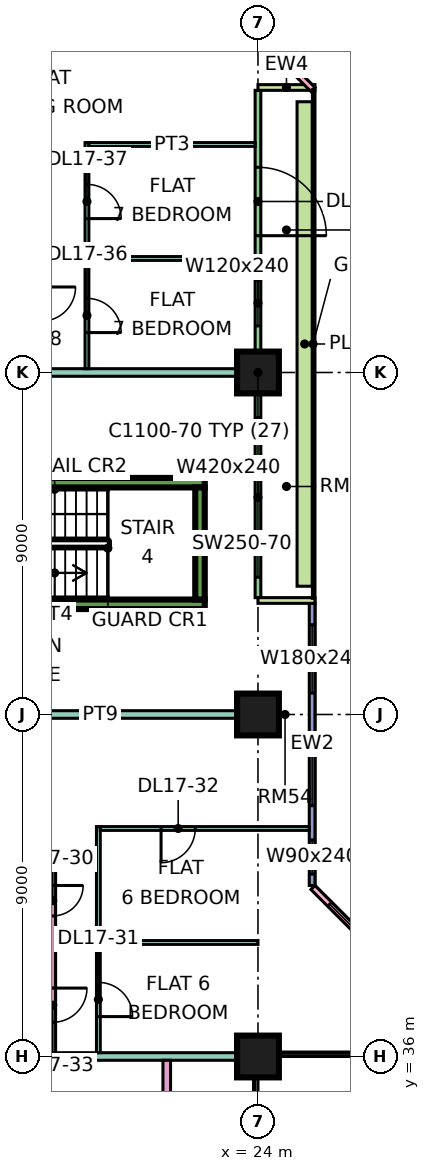
"""IFC4 building model, lengths in metres.
Left out: names, types, materials, properties, quantities, classifications, styles, units other than length and angle.
Written with IfcOpenShell. Run it as: python <this file> out.ifc"""

import sys

from ifc_helpers import new_model, si_unit, direction, frame, frame_2d, origin, origin_2d, place, context, subcontext, project, spatial, rectangle, extrude, element, fill, save


model = new_model("IFC4")
c1 = context("Model", 3, precision=1e-05, world=origin(), true_north=direction((0.0, 1.0)))
c2 = subcontext(c1, "Body", "Model", "MODEL_VIEW")
j1 = project(units=[si_unit("LENGTHUNIT", "METRE"), si_unit("PLANEANGLEUNIT", "RADIAN")], contexts=[c1])
p1 = place(None, origin())
s1 = spatial("IfcSite", under=j1, at=p1, CompositionType="ELEMENT")
p2 = place(p1, origin())
s2 = spatial("IfcBuilding", under=s1, at=p2, CompositionType="ELEMENT")
p3 = place(p2, frame((0.0, 0.0, 78.9)))
s3 = spatial("IfcBuildingStorey", under=s2, at=p3, CompositionType="ELEMENT", Elevation=78.9)
for number, where, z_axis, x_axis in (
    (1, (24.0, 36.0, 0.0), (0.0, 0.0, 1.0), (1.0, 0.0, 0.0)),
    (2, (24.0, 45.0, 0.0), (0.0, 0.0, 1.0), (1.0, 0.0, 0.0)),
    (3, (24.0, 54.0, 0.0), (0.0, 0.0, 1.0), (1.0, 0.0, 0.0)),
):
    element("IfcColumn", number, at=place(p3, frame(where, z_axis=z_axis, x_axis=x_axis)), inside=s3, PredefinedType="COLUMN", context=c2, shape_type="SweptSolid", body=[
        extrude(rectangle(XDim=1.1, YDim=1.1, at=origin_2d()), origin(), (0.0, 0.0, 1.0), 3.75),
    ])
for number, where, z_axis, x_axis in (
    (4, (15.6, 47.9, 0.0), (0.0, 0.0, 1.0), (1.0, 0.0, 0.0)),
    (5, (15.6, 51.1, 0.0), (0.0, 0.0, 1.0), (1.0, 0.0, 0.0)),
):
    element("IfcWall", number, at=place(p3, frame(where, z_axis=z_axis, x_axis=x_axis)), inside=s3, PredefinedType="SHEAR", context=c2, shape_type="SweptSolid", body=[
        extrude(rectangle(XDim=7.0, YDim=0.25, at=frame_2d((3.5, 0.0))), origin(), (0.0, 0.0, 1.0), 3.75),
    ])
p4 = place(p3, frame((22.475, 48.025, 0.0), z_axis=(0.0, 0.0, 1.0), x_axis=(0.0, 1.0, 0.0)))
e6 = element("IfcWall", 6, at=p4, inside=s3, PredefinedType="SHEAR", context=c2, shape_type="SweptSolid", body=[
    extrude(rectangle(XDim=2.95, YDim=0.25, at=frame_2d((1.475, 0.0))), origin(), (0.0, 0.0, 1.0), 3.75),
])
p5 = place(p3, frame((28.447, 37.447, 0.0), z_axis=(0.0, 0.0, 1.0), x_axis=(-0.707106781187, 0.707106781187, 0.0)))
e7 = element("IfcWall", 7, at=p5, inside=s3, PredefinedType="SOLIDWALL", context=c2, shape_type="SweptSolid", body=[
    extrude(rectangle(XDim=4.243, YDim=0.15, at=frame_2d((2.121, 0.0))), origin(), (0.0, 0.0, 1.0), 3.35),
])
p6 = place(p5, frame((0.621, 0.0, 0.45)))
e8 = element("IfcOpeningElement", 8, at=p6, cuts=e7, PredefinedType="OPENING", context=c2, shape_type="SweptSolid", body=[
    extrude(rectangle(XDim=3.0, YDim=2.4, at=frame_2d((1.5, 1.2))), frame((0.0, 0.085, 0.0), z_axis=(0.0, -1.0, 0.0), x_axis=(1.0, 0.0, 0.0)), (0.0, 0.0, 1.0), 0.17),
])
p7 = place(p3, frame((25.425, 40.5, 0.0), z_axis=(0.0, 0.0, 1.0), x_axis=(0.0, 1.0, 0.0)))
e9 = element("IfcWall", 9, at=p7, inside=s3, PredefinedType="SOLIDWALL", context=c2, shape_type="SweptSolid", body=[
    extrude(rectangle(XDim=7.425, YDim=0.15, at=frame_2d((3.712, 0.0))), origin(), (0.0, 0.0, 1.0), 3.35),
])
p8 = place(p7, frame((0.3, 0.0, 0.45)))
e10 = element("IfcOpeningElement", 10, at=p8, cuts=e9, PredefinedType="OPENING", context=c2, shape_type="SweptSolid", body=[
    extrude(rectangle(XDim=0.9, YDim=2.4, at=frame_2d((0.45, 1.2))), frame((0.0, 0.085, 0.0), z_axis=(0.0, -1.0, 0.0), x_axis=(1.0, 0.0, 0.0)), (0.0, 0.0, 1.0), 0.17),
])
p9 = place(p7, frame((2.1, 0.0, 0.45)))
e11 = element("IfcOpeningElement", 11, at=p9, cuts=e9, PredefinedType="OPENING", context=c2, shape_type="SweptSolid", body=[
    extrude(rectangle(XDim=1.8, YDim=2.4, at=frame_2d((0.9, 1.2))), frame((0.0, 0.085, 0.0), z_axis=(0.0, -1.0, 0.0), x_axis=(1.0, 0.0, 0.0)), (0.0, 0.0, 1.0), 0.17),
])
p10 = place(p7, frame((5.062, 0.0, 0.45)))
e12 = element("IfcOpeningElement", 12, at=p10, cuts=e9, PredefinedType="OPENING", context=c2, shape_type="SweptSolid", body=[
    extrude(rectangle(XDim=1.8, YDim=2.4, at=frame_2d((0.9, 1.2))), frame((0.0, 0.085, 0.0), z_axis=(0.0, -1.0, 0.0), x_axis=(1.0, 0.0, 0.0)), (0.0, 0.0, 1.0), 0.17),
])
p11 = place(p3, frame((24.0, 48.075, 0.0), z_axis=(0.0, 0.0, 1.0), x_axis=(0.0, 1.0, 0.0)))
e13 = element("IfcWall", 13, at=p11, inside=s3, PredefinedType="SOLIDWALL", context=c2, shape_type="SweptSolid", body=[
    extrude(rectangle(XDim=13.35, YDim=0.15, at=frame_2d((6.675, 0.0))), origin(), (0.0, 0.0, 1.0), 3.35),
])
p12 = place(p11, frame((0.538, 0.0, 0.45)))
e14 = element("IfcOpeningElement", 14, at=p12, cuts=e13, PredefinedType="OPENING", context=c2, shape_type="SweptSolid", body=[
    extrude(rectangle(XDim=4.2, YDim=2.4, at=frame_2d((2.1, 1.2))), frame((0.0, 0.085, 0.0), z_axis=(0.0, -1.0, 0.0), x_axis=(1.0, 0.0, 0.0)), (0.0, 0.0, 1.0), 0.17),
])
p13 = place(p11, frame((7.15, 0.0, 0.45)))
e15 = element("IfcOpeningElement", 15, at=p13, cuts=e13, PredefinedType="OPENING", context=c2, shape_type="SweptSolid", body=[
    extrude(rectangle(XDim=1.2, YDim=2.4, at=frame_2d((0.6, 1.2))), frame((0.0, 0.085, 0.0), z_axis=(0.0, -1.0, 0.0), x_axis=(1.0, 0.0, 0.0)), (0.0, 0.0, 1.0), 0.17),
])
p14 = place(p11, frame((9.525, 0.0, 0.0)))
e16 = element("IfcOpeningElement", 16, at=p14, cuts=e13, PredefinedType="OPENING", context=c2, shape_type="SweptSolid", body=[
    extrude(rectangle(XDim=1.8, YDim=2.4, at=frame_2d((0.9, 1.2))), frame((0.0, 0.085, 0.0), z_axis=(0.0, -1.0, 0.0), x_axis=(1.0, 0.0, 0.0)), (0.0, 0.0, 1.0), 0.17),
])
for number, where, z_axis, x_axis in (
    (17, (25.5, 48.0, 0.0), (0.0, 0.0, 1.0), (-1.0, 0.0, 0.0)),
    (18, (25.5, 61.5, 0.0), (0.0, 0.0, 1.0), (-1.0, 0.0, 0.0)),
):
    element("IfcWall", number, at=place(p3, frame(where, z_axis=z_axis, x_axis=x_axis)), inside=s3, PredefinedType="SOLIDWALL", context=c2, shape_type="SweptSolid", body=[
        extrude(rectangle(XDim=1.5, YDim=0.15, at=frame_2d((0.75, 0.0))), origin(), (0.0, 0.0, 1.0), 3.35),
    ])
p15 = place(p3, frame((25.447, 61.447, 0.0), z_axis=(0.0, 0.0, 1.0), x_axis=(-0.707106781187, 0.707106781187, 0.0)))
e19 = element("IfcWall", 19, at=p15, inside=s3, PredefinedType="SOLIDWALL", context=c2, shape_type="SweptSolid", body=[
    extrude(rectangle(XDim=4.243, YDim=0.15, at=frame_2d((2.121, 0.0))), origin(), (0.0, 0.0, 1.0), 3.35),
])
p16 = place(p15, frame((0.621, 0.0, 0.45)))
e20 = element("IfcOpeningElement", 20, at=p16, cuts=e19, PredefinedType="OPENING", context=c2, shape_type="SweptSolid", body=[
    extrude(rectangle(XDim=3.0, YDim=2.4, at=frame_2d((1.5, 1.2))), frame((0.0, 0.085, 0.0), z_axis=(0.0, -1.0, 0.0), x_axis=(1.0, 0.0, 0.0)), (0.0, 0.0, 1.0), 0.17),
])
p17 = place(p3, frame((25.229, 48.375, 0.0), z_axis=(0.0, 0.0, 1.0), x_axis=(0.0, 1.0, 0.0)))
e21 = element("IfcWall", 21, at=p17, inside=s3, PredefinedType="SOLIDWALL", context=c2, shape_type="SweptSolid", body=[
    extrude(rectangle(XDim=12.75, YDim=0.4, at=frame_2d((6.375, 0.0))), origin(), (0.0, 0.0, 1.0), 0.7),
])
for number, where, z_axis, x_axis in (
    (22, (15.7, 36.0, 0.0), (0.0, 0.0, 1.0), (1.0, 0.0, 0.0)),
    (23, (15.7, 45.0, 0.0), (0.0, 0.0, 1.0), (1.0, 0.0, 0.0)),
):
    element("IfcWall", number, at=place(p3, frame(where, z_axis=z_axis, x_axis=x_axis)), inside=s3, PredefinedType="PARTITIONING", context=c2, shape_type="SweptSolid", body=[
        extrude(rectangle(XDim=8.3, YDim=0.2, at=frame_2d((4.15, 0.0))), origin(), (0.0, 0.0, 1.0), 3.35),
    ])
p18 = place(p3, frame((15.7, 54.0, 0.0), z_axis=(0.0, 0.0, 1.0), x_axis=(1.0, 0.0, 0.0)))
e24 = element("IfcWall", 24, at=p18, inside=s3, PredefinedType="PARTITIONING", context=c2, shape_type="SweptSolid", body=[
    extrude(rectangle(XDim=8.226, YDim=0.2, at=frame_2d((4.113, 0.0))), origin(), (0.0, 0.0, 1.0), 3.35),
])
p19 = place(p3, frame((18.6, 36.1, 0.0), z_axis=(0.0, 0.0, 1.0), x_axis=(0.0, 1.0, 0.0)))
e25 = element("IfcWall", 25, at=p19, inside=s3, PredefinedType="PARTITIONING", context=c2, shape_type="SweptSolid", body=[
    extrude(rectangle(XDim=5.375, YDim=0.15, at=frame_2d((2.688, 0.0))), origin(), (0.0, 0.0, 1.0), 3.35),
])
p20 = place(p19, frame((3.6, 0.0, 0.0)))
e26 = element("IfcOpeningElement", 26, at=p20, cuts=e25, PredefinedType="OPENING", context=c2, shape_type="SweptSolid", body=[
    extrude(rectangle(XDim=0.8, YDim=2.1, at=frame_2d((0.4, 1.05))), frame((0.0, 0.085, 0.0), z_axis=(0.0, -1.0, 0.0), x_axis=(1.0, 0.0, 0.0)), (0.0, 0.0, 1.0), 0.17),
])
p21 = place(p19, frame((0.8, 0.0, 0.0)))
e27 = element("IfcOpeningElement", 27, at=p21, cuts=e25, PredefinedType="OPENING", context=c2, shape_type="SweptSolid", body=[
    extrude(rectangle(XDim=0.9, YDim=2.1, at=frame_2d((0.45, 1.05))), frame((0.0, 0.085, 0.0), z_axis=(0.0, -1.0, 0.0), x_axis=(1.0, 0.0, 0.0)), (0.0, 0.0, 1.0), 0.17),
])
p22 = place(p3, frame((19.5, 54.1, 0.0), z_axis=(0.0, 0.0, 1.0), x_axis=(0.0, 1.0, 0.0)))
e28 = element("IfcWall", 28, at=p22, inside=s3, PredefinedType="PARTITIONING", context=c2, shape_type="SweptSolid", body=[
    extrude(rectangle(XDim=5.95, YDim=0.1, at=frame_2d((2.975, 0.0))), origin(), (0.0, 0.0, 1.0), 3.35),
])
p23 = place(p22, frame((0.95, 0.0, 0.0)))
e29 = element("IfcOpeningElement", 29, at=p23, cuts=e28, PredefinedType="OPENING", context=c2, shape_type="SweptSolid", body=[
    extrude(rectangle(XDim=0.9, YDim=2.1, at=frame_2d((0.45, 1.05))), frame((0.0, 0.06, 0.0), z_axis=(0.0, -1.0, 0.0), x_axis=(1.0, 0.0, 0.0)), (0.0, 0.0, 1.0), 0.12),
])
p24 = place(p22, frame((3.95, 0.0, 0.0)))
e30 = element("IfcOpeningElement", 30, at=p24, cuts=e28, PredefinedType="OPENING", context=c2, shape_type="SweptSolid", body=[
    extrude(rectangle(XDim=0.9, YDim=2.1, at=frame_2d((0.45, 1.05))), frame((0.0, 0.06, 0.0), z_axis=(0.0, -1.0, 0.0), x_axis=(1.0, 0.0, 0.0)), (0.0, 0.0, 1.0), 0.12),
])
for number, where, z_axis, x_axis in (
    (31, (19.55, 57.0, 0.0), (0.0, 0.0, 1.0), (1.0, 0.0, 0.0)),
    (32, (19.55, 60.0, 0.0), (0.0, 0.0, 1.0), (1.0, 0.0, 0.0)),
):
    element("IfcWall", number, at=place(p3, frame(where, z_axis=z_axis, x_axis=x_axis)), inside=s3, PredefinedType="PARTITIONING", context=c2, shape_type="SweptSolid", body=[
        extrude(rectangle(XDim=4.376, YDim=0.1, at=frame_2d((2.188, 0.0))), origin(), (0.0, 0.0, 1.0), 3.35),
    ])
p25 = place(p3, frame((19.8, 36.1, 0.0), z_axis=(0.0, 0.0, 1.0), x_axis=(0.0, 1.0, 0.0)))
e33 = element("IfcWall", 33, at=p25, inside=s3, PredefinedType="PARTITIONING", context=c2, shape_type="SweptSolid", body=[
    extrude(rectangle(XDim=5.95, YDim=0.1, at=frame_2d((2.975, 0.0))), origin(), (0.0, 0.0, 1.0), 3.35),
])
p26 = place(p25, frame((0.95, 0.0, 0.0)))
e34 = element("IfcOpeningElement", 34, at=p26, cuts=e33, PredefinedType="OPENING", context=c2, shape_type="SweptSolid", body=[
    extrude(rectangle(XDim=0.9, YDim=2.1, at=frame_2d((0.45, 1.05))), frame((0.0, 0.06, 0.0), z_axis=(0.0, -1.0, 0.0), x_axis=(1.0, 0.0, 0.0)), (0.0, 0.0, 1.0), 0.12),
])
p27 = place(p3, frame((19.85, 39.0, 0.0), z_axis=(0.0, 0.0, 1.0), x_axis=(1.0, 0.0, 0.0)))
e35 = element("IfcWall", 35, at=p27, inside=s3, PredefinedType="PARTITIONING", context=c2, shape_type="SweptSolid", body=[
    extrude(rectangle(XDim=4.15, YDim=0.1, at=frame_2d((2.075, 0.0))), origin(), (0.0, 0.0, 1.0), 3.35),
])
p28 = place(p3, frame((19.85, 42.0, 0.0), z_axis=(0.0, 0.0, 1.0), x_axis=(1.0, 0.0, 0.0)))
e36 = element("IfcWall", 36, at=p28, inside=s3, PredefinedType="PARTITIONING", context=c2, shape_type="SweptSolid", body=[
    extrude(rectangle(XDim=5.5, YDim=0.1, at=frame_2d((2.75, 0.0))), origin(), (0.0, 0.0, 1.0), 3.35),
])
p29 = place(p28, frame((1.6, 0.0, 0.0)))
e37 = element("IfcOpeningElement", 37, at=p29, cuts=e36, PredefinedType="OPENING", context=c2, shape_type="SweptSolid", body=[
    extrude(rectangle(XDim=0.9, YDim=2.1, at=frame_2d((0.45, 1.05))), frame((0.0, 0.06, 0.0), z_axis=(0.0, -1.0, 0.0), x_axis=(1.0, 0.0, 0.0)), (0.0, 0.0, 1.0), 0.12),
])
p30 = place(p3, frame((21.6, 23.9, 0.0), z_axis=(0.0, 0.0, 1.0), x_axis=(0.0, 1.0, 0.0)))
e38 = element("IfcWall", 38, at=p30, inside=s3, PredefinedType="PARTITIONING", context=c2, shape_type="SweptSolid", body=[
    extrude(rectangle(XDim=12.0, YDim=0.2, at=frame_2d((6.0, 0.0))), origin(), (0.0, 0.0, 1.0), 3.35),
])
p31 = place(p6, origin())
e39 = element("IfcWindow", 39, at=p31, inside=s3, PartitioningType="SINGLE_PANEL", PredefinedType="WINDOW", context=c2, shape_type="SweptSolid", body=[
    extrude(rectangle(XDim=3.0, YDim=2.4, at=frame_2d((1.5, 1.2))), frame((0.0, 0.03, 0.0), z_axis=(0.0, -1.0, 0.0), x_axis=(1.0, 0.0, 0.0)), (0.0, 0.0, 1.0), 0.06),
])
fill(e8, e39)
p32 = place(p8, origin())
e40 = element("IfcWindow", 40, at=p32, inside=s3, PartitioningType="SINGLE_PANEL", PredefinedType="WINDOW", context=c2, shape_type="SweptSolid", body=[
    extrude(rectangle(XDim=0.9, YDim=2.4, at=frame_2d((0.45, 1.2))), frame((0.0, 0.03, 0.0), z_axis=(0.0, -1.0, 0.0), x_axis=(1.0, 0.0, 0.0)), (0.0, 0.0, 1.0), 0.06),
])
fill(e10, e40)
p33 = place(p9, origin())
e41 = element("IfcWindow", 41, at=p33, inside=s3, PartitioningType="SINGLE_PANEL", PredefinedType="WINDOW", context=c2, shape_type="SweptSolid", body=[
    extrude(rectangle(XDim=1.8, YDim=2.4, at=frame_2d((0.9, 1.2))), frame((0.0, 0.03, 0.0), z_axis=(0.0, -1.0, 0.0), x_axis=(1.0, 0.0, 0.0)), (0.0, 0.0, 1.0), 0.06),
])
fill(e11, e41)
p34 = place(p10, origin())
e42 = element("IfcWindow", 42, at=p34, inside=s3, PartitioningType="SINGLE_PANEL", PredefinedType="WINDOW", context=c2, shape_type="SweptSolid", body=[
    extrude(rectangle(XDim=1.8, YDim=2.4, at=frame_2d((0.9, 1.2))), frame((0.0, 0.03, 0.0), z_axis=(0.0, -1.0, 0.0), x_axis=(1.0, 0.0, 0.0)), (0.0, 0.0, 1.0), 0.06),
])
fill(e12, e42)
p35 = place(p12, origin())
e43 = element("IfcWindow", 43, at=p35, inside=s3, PartitioningType="SINGLE_PANEL", PredefinedType="WINDOW", context=c2, shape_type="SweptSolid", body=[
    extrude(rectangle(XDim=4.2, YDim=2.4, at=frame_2d((2.1, 1.2))), frame((0.0, 0.03, 0.0), z_axis=(0.0, -1.0, 0.0), x_axis=(1.0, 0.0, 0.0)), (0.0, 0.0, 1.0), 0.06),
])
fill(e14, e43)
p36 = place(p13, origin())
e44 = element("IfcWindow", 44, at=p36, inside=s3, PartitioningType="SINGLE_PANEL", PredefinedType="WINDOW", context=c2, shape_type="SweptSolid", body=[
    extrude(rectangle(XDim=1.2, YDim=2.4, at=frame_2d((0.6, 1.2))), frame((0.0, 0.03, 0.0), z_axis=(0.0, -1.0, 0.0), x_axis=(1.0, 0.0, 0.0)), (0.0, 0.0, 1.0), 0.06),
])
fill(e15, e44)
p37 = place(p14, frame((1.8, 0.0, 0.0), z_axis=(0.0, 0.0, 1.0), x_axis=(-1.0, 0.0, 0.0)))
e45 = element("IfcDoor", 45, at=p37, inside=s3, OperationType="DOUBLE_DOOR_SINGLE_SWING", PredefinedType="DOOR", context=c2, shape_type="SweptSolid", body=[
    extrude(rectangle(XDim=1.8, YDim=2.4, at=frame_2d((0.9, 1.2))), frame((0.0, 0.025, 0.0), z_axis=(0.0, -1.0, 0.0), x_axis=(1.0, 0.0, 0.0)), (0.0, 0.0, 1.0), 0.05),
])
fill(e16, e45)
p38 = place(p16, origin())
e46 = element("IfcWindow", 46, at=p38, inside=s3, PartitioningType="SINGLE_PANEL", PredefinedType="WINDOW", context=c2, shape_type="SweptSolid", body=[
    extrude(rectangle(XDim=3.0, YDim=2.4, at=frame_2d((1.5, 1.2))), frame((0.0, 0.03, 0.0), z_axis=(0.0, -1.0, 0.0), x_axis=(1.0, 0.0, 0.0)), (0.0, 0.0, 1.0), 0.06),
])
fill(e20, e46)
p39 = place(p20, origin())
e47 = element("IfcDoor", 47, at=p39, inside=s3, OperationType="SINGLE_SWING_RIGHT", PredefinedType="DOOR", context=c2, shape_type="SweptSolid", body=[
    extrude(rectangle(XDim=0.8, YDim=2.1, at=frame_2d((0.4, 1.05))), frame((0.0, 0.025, 0.0), z_axis=(0.0, -1.0, 0.0), x_axis=(1.0, 0.0, 0.0)), (0.0, 0.0, 1.0), 0.05),
])
fill(e26, e47)
p40 = place(p26, frame((0.9, 0.0, 0.0), z_axis=(0.0, 0.0, 1.0), x_axis=(-1.0, 0.0, 0.0)))
e48 = element("IfcDoor", 48, at=p40, inside=s3, OperationType="SINGLE_SWING_LEFT", PredefinedType="DOOR", context=c2, shape_type="SweptSolid", body=[
    extrude(rectangle(XDim=0.9, YDim=2.1, at=frame_2d((0.45, 1.05))), frame((0.0, 0.025, 0.0), z_axis=(0.0, -1.0, 0.0), x_axis=(1.0, 0.0, 0.0)), (0.0, 0.0, 1.0), 0.05),
])
fill(e34, e48)
p41 = place(p29, frame((0.9, 0.0, 0.0), z_axis=(0.0, 0.0, 1.0), x_axis=(-1.0, 0.0, 0.0)))
e49 = element("IfcDoor", 49, at=p41, inside=s3, OperationType="SINGLE_SWING_LEFT", PredefinedType="DOOR", context=c2, shape_type="SweptSolid", body=[
    extrude(rectangle(XDim=0.9, YDim=2.1, at=frame_2d((0.45, 1.05))), frame((0.0, 0.025, 0.0), z_axis=(0.0, -1.0, 0.0), x_axis=(1.0, 0.0, 0.0)), (0.0, 0.0, 1.0), 0.05),
])
fill(e37, e49)
p42 = place(p21, origin())
e50 = element("IfcDoor", 50, at=p42, inside=s3, OperationType="SINGLE_SWING_RIGHT", PredefinedType="DOOR", context=c2, shape_type="SweptSolid", body=[
    extrude(rectangle(XDim=0.9, YDim=2.1, at=frame_2d((0.45, 1.05))), frame((0.0, 0.025, 0.0), z_axis=(0.0, -1.0, 0.0), x_axis=(1.0, 0.0, 0.0)), (0.0, 0.0, 1.0), 0.05),
])
fill(e27, e50)
p43 = place(p23, frame((0.9, 0.0, 0.0), z_axis=(0.0, 0.0, 1.0), x_axis=(-1.0, 0.0, 0.0)))
e51 = element("IfcDoor", 51, at=p43, inside=s3, OperationType="SINGLE_SWING_LEFT", PredefinedType="DOOR", context=c2, shape_type="SweptSolid", body=[
    extrude(rectangle(XDim=0.9, YDim=2.1, at=frame_2d((0.45, 1.05))), frame((0.0, 0.025, 0.0), z_axis=(0.0, -1.0, 0.0), x_axis=(1.0, 0.0, 0.0)), (0.0, 0.0, 1.0), 0.05),
])
fill(e29, e51)
p44 = place(p24, frame((0.9, 0.0, 0.0), z_axis=(0.0, 0.0, 1.0), x_axis=(-1.0, 0.0, 0.0)))
e52 = element("IfcDoor", 52, at=p44, inside=s3, OperationType="SINGLE_SWING_LEFT", PredefinedType="DOOR", context=c2, shape_type="SweptSolid", body=[
    extrude(rectangle(XDim=0.9, YDim=2.1, at=frame_2d((0.45, 1.05))), frame((0.0, 0.025, 0.0), z_axis=(0.0, -1.0, 0.0), x_axis=(1.0, 0.0, 0.0)), (0.0, 0.0, 1.0), 0.05),
])
fill(e30, e52)
save(model, sys.argv[1])
